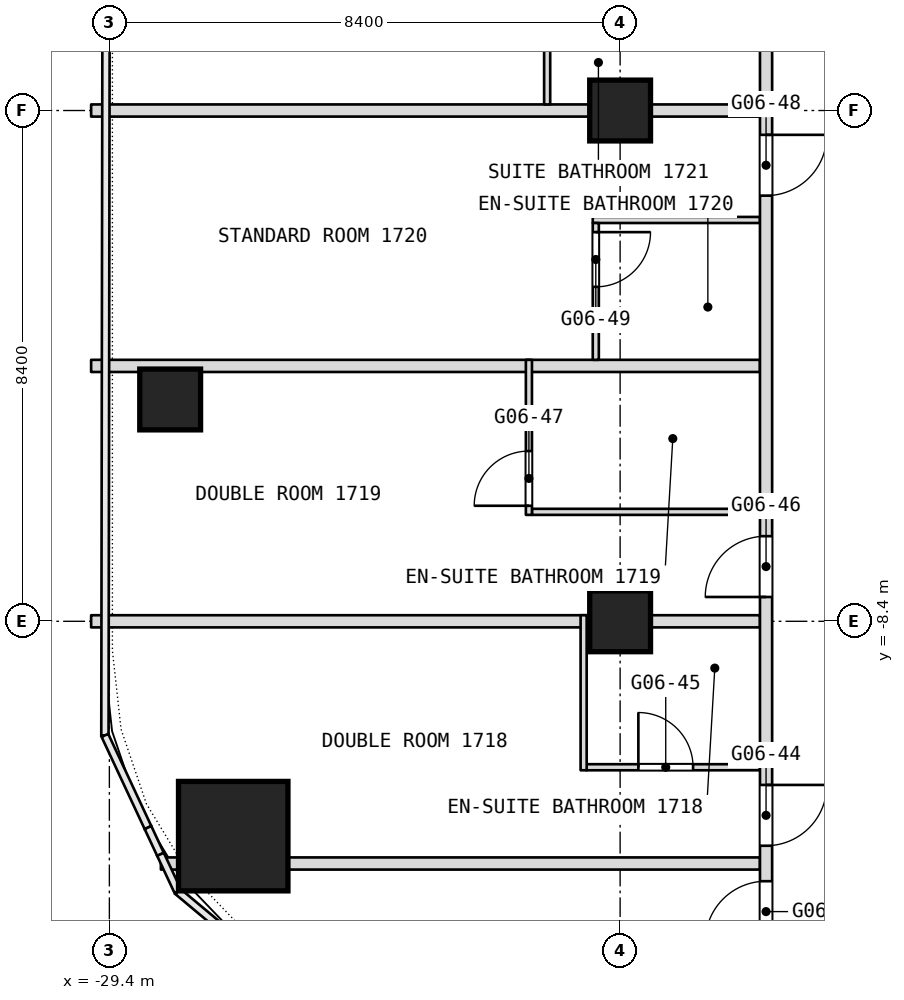
"""IFC4 building model, lengths in metres.
Left out: names, types, materials, properties, quantities, classifications, styles, units other than length and angle.
Written with IfcOpenShell. Run it as: python <this file> out.ifc"""

import sys

from ifc_helpers import new_model, si_unit, direction, frame, frame_2d, origin, origin_2d, place, context, subcontext, project, spatial, rectangle, extrude, element, fill, save


model = new_model("IFC4")
c1 = context("Model", 3, precision=1e-05, world=origin(), true_north=direction((0.0, 1.0)))
c2 = subcontext(c1, "Body", "Model", "MODEL_VIEW")
j1 = project(units=[si_unit("LENGTHUNIT", "METRE"), si_unit("PLANEANGLEUNIT", "RADIAN")], contexts=[c1])
p1 = place(None, origin())
s1 = spatial("IfcSite", under=j1, at=p1, CompositionType="ELEMENT")
p2 = place(p1, origin())
s2 = spatial("IfcBuilding", under=s1, at=p2, CompositionType="ELEMENT")
p3 = place(p2, frame((0.0, 0.0, 76.1)))
s3 = spatial("IfcBuildingStorey", under=s2, at=p3, CompositionType="ELEMENT", Elevation=76.1)
p4 = place(p3, frame((-27.363, -11.933, 0.0), z_axis=(0.0, 0.0, 1.0), x_axis=(1.0, 0.0, 0.0)))
e1 = element("IfcColumn", 1, at=p4, inside=s3, PredefinedType="COLUMN", context=c2, shape_type="SweptSolid", body=[
    extrude(rectangle(XDim=1.8, YDim=1.8, at=origin_2d()), origin(), (0.0, 0.0, 1.0), 3.6),
])
for number, where, z_axis, x_axis in (
    (2, (-21.0, -8.4, 0.0), (0.0, 0.0, 1.0), (1.0, 0.0, 0.0)),
    (3, (-21.0, 0.0, 0.0), (0.0, 0.0, 1.0), (1.0, 0.0, 0.0)),
    (4, (-28.4, -4.752, 0.0), (0.0, 0.0, 1.0), (1.0, 0.0, 0.0)),
):
    element("IfcColumn", number, at=place(p3, frame(where, z_axis=z_axis, x_axis=x_axis)), inside=s3, PredefinedType="COLUMN", context=c2, shape_type="SweptSolid", body=[
        extrude(rectangle(XDim=1.0, YDim=1.0, at=origin_2d()), origin(), (0.0, 0.0, 1.0), 3.6),
    ])
p5 = place(p3, frame((-28.553, -12.383, 0.0), z_axis=(0.0, 0.0, 1.0), x_axis=(1.0, 0.0, 0.0)))
e5 = element("IfcWall", 5, at=p5, inside=s3, PredefinedType="PARTITIONING", context=c2, shape_type="SweptSolid", body=[
    extrude(rectangle(XDim=0.29, YDim=0.2, at=frame_2d((0.145, 0.0))), origin(), (0.0, 0.0, 1.0), 3.34),
])
p6 = place(p3, frame((-26.463, -12.383, 0.0), z_axis=(0.0, 0.0, 1.0), x_axis=(1.0, 0.0, 0.0)))
e6 = element("IfcWall", 6, at=p6, inside=s3, PredefinedType="PARTITIONING", context=c2, shape_type="SweptSolid", body=[
    extrude(rectangle(XDim=7.763, YDim=0.2, at=frame_2d((3.881, 0.0))), origin(), (0.0, 0.0, 1.0), 3.34),
])
p7 = place(p3, frame((-21.55, -10.8, 0.0), z_axis=(0.0, 0.0, 1.0), x_axis=(1.0, 0.0, 0.0)))
e7 = element("IfcWall", 7, at=p7, inside=s3, PredefinedType="PARTITIONING", context=c2, shape_type="SweptSolid", body=[
    extrude(rectangle(XDim=2.85, YDim=0.1, at=frame_2d((1.425, 0.0))), origin(), (0.0, 0.0, 1.0), 3.34),
])
p8 = place(p7, frame((0.85, 0.0, 0.0)))
e8 = element("IfcOpeningElement", 8, at=p8, cuts=e7, PredefinedType="OPENING", context=c2, shape_type="SweptSolid", body=[
    extrude(rectangle(XDim=0.9, YDim=2.1, at=frame_2d((0.45, 1.05))), frame((0.0, 0.05, 0.0), z_axis=(0.0, -1.0, 0.0), x_axis=(1.0, 0.0, 0.0)), (0.0, 0.0, 1.0), 0.1),
])
p9 = place(p3, frame((-29.7, -8.4, 0.0), z_axis=(0.0, 0.0, 1.0), x_axis=(1.0, 0.0, 0.0)))
e9 = element("IfcWall", 9, at=p9, inside=s3, PredefinedType="PARTITIONING", context=c2, shape_type="SweptSolid", body=[
    extrude(rectangle(XDim=11.0, YDim=0.2, at=frame_2d((5.5, 0.0))), origin(), (0.0, 0.0, 1.0), 2.84),
])
p10 = place(p3, frame((-22.45, -6.6, 0.0), z_axis=(0.0, 0.0, 1.0), x_axis=(1.0, 0.0, 0.0)))
e10 = element("IfcWall", 10, at=p10, inside=s3, PredefinedType="PARTITIONING", context=c2, shape_type="SweptSolid", body=[
    extrude(rectangle(XDim=3.75, YDim=0.1, at=frame_2d((1.875, 0.0))), origin(), (0.0, 0.0, 1.0), 3.34),
])
p11 = place(p3, frame((-29.7, -4.2, 0.0), z_axis=(0.0, 0.0, 1.0), x_axis=(1.0, 0.0, 0.0)))
e11 = element("IfcWall", 11, at=p11, inside=s3, PredefinedType="PARTITIONING", context=c2, shape_type="SweptSolid", body=[
    extrude(rectangle(XDim=11.0, YDim=0.2, at=frame_2d((5.5, 0.0))), origin(), (0.0, 0.0, 1.0), 3.34),
])
p12 = place(p3, frame((-21.45, -1.8, 0.0), z_axis=(0.0, 0.0, 1.0), x_axis=(1.0, 0.0, 0.0)))
e12 = element("IfcWall", 12, at=p12, inside=s3, PredefinedType="PARTITIONING", context=c2, shape_type="SweptSolid", body=[
    extrude(rectangle(XDim=2.75, YDim=0.1, at=frame_2d((1.375, 0.0))), origin(), (0.0, 0.0, 1.0), 3.34),
])
p13 = place(p3, frame((-29.7, 0.0, 0.0), z_axis=(0.0, 0.0, 1.0), x_axis=(1.0, 0.0, 0.0)))
e13 = element("IfcWall", 13, at=p13, inside=s3, PredefinedType="PARTITIONING", context=c2, shape_type="SweptSolid", body=[
    extrude(rectangle(XDim=11.0, YDim=0.2, at=frame_2d((5.5, 0.0))), origin(), (0.0, 0.0, 1.0), 2.84),
])
p14 = place(p3, frame((-18.6, -16.665, 0.0), z_axis=(0.0, 0.0, 1.0), x_axis=(0.0, 1.0, 0.0)))
e14 = element("IfcWall", 14, at=p14, inside=s3, PredefinedType="PARTITIONING", context=c2, shape_type="SweptSolid", body=[
    extrude(rectangle(XDim=23.565, YDim=0.2, at=frame_2d((11.782, 0.0))), origin(), (0.0, 0.0, 1.0), 3.34),
])
p15 = place(p14, frame((2.991, 0.0, 0.0)))
e15 = element("IfcOpeningElement", 15, at=p15, cuts=e14, PredefinedType="OPENING", context=c2, shape_type="SweptSolid", body=[
    extrude(rectangle(XDim=1.0, YDim=2.1, at=frame_2d((0.5, 1.05))), frame((0.0, 0.1, 0.0), z_axis=(0.0, -1.0, 0.0), x_axis=(1.0, 0.0, 0.0)), (0.0, 0.0, 1.0), 0.2),
])
p16 = place(p14, frame((4.574, 0.0, 0.0)))
e16 = element("IfcOpeningElement", 16, at=p16, cuts=e14, PredefinedType="OPENING", context=c2, shape_type="SweptSolid", body=[
    extrude(rectangle(XDim=1.0, YDim=2.1, at=frame_2d((0.5, 1.05))), frame((0.0, 0.1, 0.0), z_axis=(0.0, -1.0, 0.0), x_axis=(1.0, 0.0, 0.0)), (0.0, 0.0, 1.0), 0.2),
])
p17 = place(p14, frame((8.665, 0.0, 0.0)))
e17 = element("IfcOpeningElement", 17, at=p17, cuts=e14, PredefinedType="OPENING", context=c2, shape_type="SweptSolid", body=[
    extrude(rectangle(XDim=1.0, YDim=2.1, at=frame_2d((0.5, 1.05))), frame((0.0, 0.1, 0.0), z_axis=(0.0, -1.0, 0.0), x_axis=(1.0, 0.0, 0.0)), (0.0, 0.0, 1.0), 0.2),
])
p18 = place(p14, frame((15.265, 0.0, 0.0)))
e18 = element("IfcOpeningElement", 18, at=p18, cuts=e14, PredefinedType="OPENING", context=c2, shape_type="SweptSolid", body=[
    extrude(rectangle(XDim=1.0, YDim=2.1, at=frame_2d((0.5, 1.05))), frame((0.0, 0.1, 0.0), z_axis=(0.0, -1.0, 0.0), x_axis=(1.0, 0.0, 0.0)), (0.0, 0.0, 1.0), 0.2),
])
p19 = place(p3, frame((-21.4, -4.1, 0.0), z_axis=(0.0, 0.0, 1.0), x_axis=(0.0, 1.0, 0.0)))
e19 = element("IfcWall", 19, at=p19, inside=s3, PredefinedType="PARTITIONING", context=c2, shape_type="SweptSolid", body=[
    extrude(rectangle(XDim=2.25, YDim=0.1, at=frame_2d((1.125, 0.0))), origin(), (0.0, 0.0, 1.0), 3.34),
])
p20 = place(p19, frame((1.2, 0.0, 0.0)))
e20 = element("IfcOpeningElement", 20, at=p20, cuts=e19, PredefinedType="OPENING", context=c2, shape_type="SweptSolid", body=[
    extrude(rectangle(XDim=0.9, YDim=2.1, at=frame_2d((0.45, 1.05))), frame((0.0, 0.05, 0.0), z_axis=(0.0, -1.0, 0.0), x_axis=(1.0, 0.0, 0.0)), (0.0, 0.0, 1.0), 0.1),
])
p21 = place(p3, frame((-21.6, -10.85, 0.0), z_axis=(0.0, 0.0, 1.0), x_axis=(0.0, 1.0, 0.0)))
e21 = element("IfcWall", 21, at=p21, inside=s3, PredefinedType="PARTITIONING", context=c2, shape_type="SweptSolid", body=[
    extrude(rectangle(XDim=2.55, YDim=0.1, at=frame_2d((1.275, 0.0))), origin(), (0.0, 0.0, 1.0), 3.34),
])
p22 = place(p3, frame((-22.2, 0.1, 0.0), z_axis=(0.0, 0.0, 1.0), x_axis=(0.0, 1.0, 0.0)))
e22 = element("IfcWall", 22, at=p22, inside=s3, PredefinedType="PARTITIONING", context=c2, shape_type="SweptSolid", body=[
    extrude(rectangle(XDim=2.25, YDim=0.1, at=frame_2d((1.125, 0.0))), origin(), (0.0, 0.0, 1.0), 3.34),
])
p23 = place(p3, frame((-22.5, -6.65, 0.0), z_axis=(0.0, 0.0, 1.0), x_axis=(0.0, 1.0, 0.0)))
e23 = element("IfcWall", 23, at=p23, inside=s3, PredefinedType="PARTITIONING", context=c2, shape_type="SweptSolid", body=[
    extrude(rectangle(XDim=2.55, YDim=0.1, at=frame_2d((1.275, 0.0))), origin(), (0.0, 0.0, 1.0), 3.34),
])
p24 = place(p23, frame((0.15, 0.0, 0.0)))
e24 = element("IfcOpeningElement", 24, at=p24, cuts=e23, PredefinedType="OPENING", context=c2, shape_type="SweptSolid", body=[
    extrude(rectangle(XDim=0.9, YDim=2.1, at=frame_2d((0.45, 1.05))), frame((0.0, 0.05, 0.0), z_axis=(0.0, -1.0, 0.0), x_axis=(1.0, 0.0, 0.0)), (0.0, 0.0, 1.0), 0.1),
])
p25 = place(p8, origin())
e25 = element("IfcDoor", 25, at=p25, inside=s3, OperationType="SINGLE_SWING_LEFT", PredefinedType="DOOR", context=c2, shape_type="SweptSolid", body=[
    extrude(rectangle(XDim=0.9, YDim=2.1, at=frame_2d((0.45, 1.05))), frame((0.0, 0.025, 0.0), z_axis=(0.0, -1.0, 0.0), x_axis=(1.0, 0.0, 0.0)), (0.0, 0.0, 1.0), 0.05),
])
fill(e8, e25)
p26 = place(p15, origin())
e26 = element("IfcDoor", 26, at=p26, inside=s3, OperationType="SINGLE_SWING_LEFT", PredefinedType="DOOR", context=c2, shape_type="SweptSolid", body=[
    extrude(rectangle(XDim=1.0, YDim=2.1, at=frame_2d((0.5, 1.05))), frame((0.0, 0.025, 0.0), z_axis=(0.0, -1.0, 0.0), x_axis=(1.0, 0.0, 0.0)), (0.0, 0.0, 1.0), 0.05),
])
fill(e15, e26)
p27 = place(p16, origin())
e27 = element("IfcDoor", 27, at=p27, inside=s3, OperationType="SINGLE_SWING_LEFT", PredefinedType="DOOR", context=c2, shape_type="SweptSolid", body=[
    extrude(rectangle(XDim=1.0, YDim=2.1, at=frame_2d((0.5, 1.05))), frame((0.0, 0.025, 0.0), z_axis=(0.0, -1.0, 0.0), x_axis=(1.0, 0.0, 0.0)), (0.0, 0.0, 1.0), 0.05),
])
fill(e16, e27)
p28 = place(p17, origin())
e28 = element("IfcDoor", 28, at=p28, inside=s3, OperationType="SINGLE_SWING_LEFT", PredefinedType="DOOR", context=c2, shape_type="SweptSolid", body=[
    extrude(rectangle(XDim=1.0, YDim=2.1, at=frame_2d((0.5, 1.05))), frame((0.0, 0.025, 0.0), z_axis=(0.0, -1.0, 0.0), x_axis=(1.0, 0.0, 0.0)), (0.0, 0.0, 1.0), 0.05),
])
fill(e17, e28)
p29 = place(p18, origin())
e29 = element("IfcDoor", 29, at=p29, inside=s3, OperationType="SINGLE_SWING_LEFT", PredefinedType="DOOR", context=c2, shape_type="SweptSolid", body=[
    extrude(rectangle(XDim=1.0, YDim=2.1, at=frame_2d((0.5, 1.05))), frame((0.0, 0.025, 0.0), z_axis=(0.0, -1.0, 0.0), x_axis=(1.0, 0.0, 0.0)), (0.0, 0.0, 1.0), 0.05),
])
fill(e18, e29)
p30 = place(p20, origin())
e30 = element("IfcDoor", 30, at=p30, inside=s3, OperationType="SINGLE_SWING_LEFT", PredefinedType="DOOR", context=c2, shape_type="SweptSolid", body=[
    extrude(rectangle(XDim=0.9, YDim=2.1, at=frame_2d((0.45, 1.05))), frame((0.0, 0.025, 0.0), z_axis=(0.0, -1.0, 0.0), x_axis=(1.0, 0.0, 0.0)), (0.0, 0.0, 1.0), 0.05),
])
fill(e20, e30)
p31 = place(p24, origin())
e31 = element("IfcDoor", 31, at=p31, inside=s3, OperationType="SINGLE_SWING_RIGHT", PredefinedType="DOOR", context=c2, shape_type="SweptSolid", body=[
    extrude(rectangle(XDim=0.9, YDim=2.1, at=frame_2d((0.45, 1.05))), frame((0.0, 0.025, 0.0), z_axis=(0.0, -1.0, 0.0), x_axis=(1.0, 0.0, 0.0)), (0.0, 0.0, 1.0), 0.05),
])
fill(e24, e31)
save(model, sys.argv[1])
